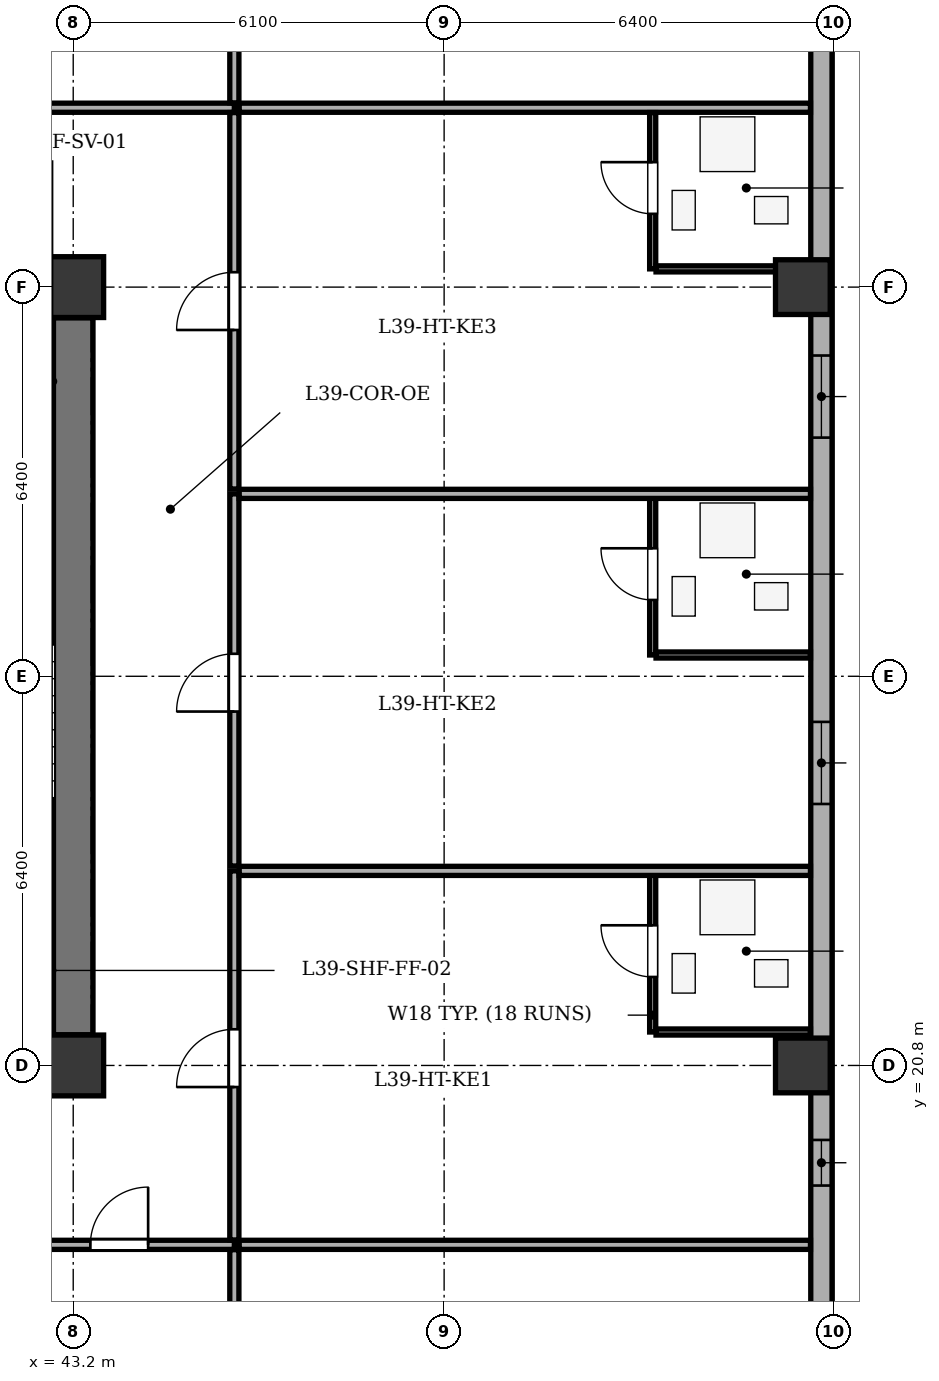
"""IFC4 building model, lengths in metres.
Left out: names, types, materials, properties, quantities, classifications, styles, units other than length and angle.
Written with IfcOpenShell. Run it as: python <this file> out.ifc"""

import sys

from ifc_helpers import new_model, si_unit, direction, frame, frame_2d, origin, origin_2d, place, context, subcontext, project, spatial, rectangle, extrude, element, fill, save


model = new_model("IFC4")
c1 = context("Model", 3, precision=1e-05, world=origin(), true_north=direction((0.0, 1.0)))
c2 = subcontext(c1, "Body", "Model", "MODEL_VIEW")
j1 = project(units=[si_unit("LENGTHUNIT", "METRE"), si_unit("PLANEANGLEUNIT", "RADIAN")], contexts=[c1])
p1 = place(None, origin())
s1 = spatial("IfcSite", under=j1, at=p1, CompositionType="ELEMENT")
p2 = place(p1, origin())
s2 = spatial("IfcBuilding", under=s1, at=p2, CompositionType="ELEMENT")
p3 = place(p2, frame((0.0, 0.0, 155.3)))
s3 = spatial("IfcBuildingStorey", under=s2, at=p3, CompositionType="ELEMENT", Elevation=155.3)
for number, where, z_axis, x_axis in (
    (1, (43.2, 20.8, 0.0), (0.0, 0.0, 1.0), (1.0, 0.0, 0.0)),
    (2, (43.2, 33.6, 0.0), (0.0, 0.0, 1.0), (1.0, 0.0, 0.0)),
):
    element("IfcColumn", number, at=place(p3, frame(where, z_axis=z_axis, x_axis=x_axis)), inside=s3, PredefinedType="COLUMN", context=c2, shape_type="SweptSolid", body=[
        extrude(rectangle(XDim=1.0, YDim=1.0, at=origin_2d()), origin(), (0.0, 0.0, 1.0), 3.5),
    ])
for number, where, z_axis, x_axis in (
    (3, (55.2, 20.8, 0.0), (0.0, 0.0, 1.0), (1.0, 0.0, 0.0)),
    (4, (55.2, 33.6, 0.0), (0.0, 0.0, 1.0), (1.0, 0.0, 0.0)),
):
    element("IfcColumn", number, at=place(p3, frame(where, z_axis=z_axis, x_axis=x_axis)), inside=s3, PredefinedType="COLUMN", context=c2, shape_type="SweptSolid", body=[
        extrude(rectangle(XDim=0.9, YDim=0.9, at=origin_2d()), origin(), (0.0, 0.0, 1.0), 3.5),
    ])
p4 = place(p3, frame((55.505, 41.5, 0.0), z_axis=(0.0, 0.0, 1.0), x_axis=(0.0, -1.0, 0.0)))
e5 = element("IfcWall", 5, at=p4, inside=s3, PredefinedType="STANDARD", context=c2, shape_type="SweptSolid", body=[
    extrude(rectangle(XDim=35.0, YDim=0.35, at=frame_2d((17.5, 0.0))), origin(), (0.0, 0.0, 1.0), 2.785),
])
p5 = place(p4, frame((1.813, 0.0, 0.75)))
e6 = element("IfcOpeningElement", 6, at=p5, cuts=e5, PredefinedType="OPENING", context=c2, shape_type="SweptSolid", body=[
    extrude(rectangle(XDim=1.6, YDim=1.75, at=frame_2d((0.8, 0.875))), frame((0.0, 0.185, 0.0), z_axis=(0.0, -1.0, 0.0), x_axis=(1.0, 0.0, 0.0)), (0.0, 0.0, 1.0), 0.37),
])
p6 = place(p4, frame((9.025, 0.0, 0.75)))
e7 = element("IfcOpeningElement", 7, at=p6, cuts=e5, PredefinedType="OPENING", context=c2, shape_type="SweptSolid", body=[
    extrude(rectangle(XDim=1.35, YDim=1.75, at=frame_2d((0.675, 0.875))), frame((0.0, 0.185, 0.0), z_axis=(0.0, -1.0, 0.0), x_axis=(1.0, 0.0, 0.0)), (0.0, 0.0, 1.0), 0.37),
])
p7 = place(p4, frame((15.05, 0.0, 0.75)))
e8 = element("IfcOpeningElement", 8, at=p7, cuts=e5, PredefinedType="OPENING", context=c2, shape_type="SweptSolid", body=[
    extrude(rectangle(XDim=1.35, YDim=1.75, at=frame_2d((0.675, 0.875))), frame((0.0, 0.185, 0.0), z_axis=(0.0, -1.0, 0.0), x_axis=(1.0, 0.0, 0.0)), (0.0, 0.0, 1.0), 0.37),
])
p8 = place(p4, frame((25.97, 0.0, 0.75)))
e9 = element("IfcOpeningElement", 9, at=p8, cuts=e5, PredefinedType="OPENING", context=c2, shape_type="SweptSolid", body=[
    extrude(rectangle(XDim=1.6, YDim=1.75, at=frame_2d((0.8, 0.875))), frame((0.0, 0.185, 0.0), z_axis=(0.0, -1.0, 0.0), x_axis=(1.0, 0.0, 0.0)), (0.0, 0.0, 1.0), 0.37),
])
p9 = place(p4, frame((30.555, 0.0, 0.75)))
e10 = element("IfcOpeningElement", 10, at=p9, cuts=e5, PredefinedType="OPENING", context=c2, shape_type="SweptSolid", body=[
    extrude(rectangle(XDim=2.1, YDim=1.75, at=frame_2d((1.05, 0.875))), frame((0.0, 0.185, 0.0), z_axis=(0.0, -1.0, 0.0), x_axis=(1.0, 0.0, 0.0)), (0.0, 0.0, 1.0), 0.37),
])
p10 = place(p4, frame((21.925, 0.0, 0.75)))
e11 = element("IfcOpeningElement", 11, at=p10, cuts=e5, PredefinedType="OPENING", context=c2, shape_type="SweptSolid", body=[
    extrude(rectangle(XDim=0.75, YDim=1.45, at=frame_2d((0.375, 0.725))), frame((0.0, 0.185, 0.0), z_axis=(0.0, -1.0, 0.0), x_axis=(1.0, 0.0, 0.0)), (0.0, 0.0, 1.0), 0.37),
])
p11 = place(p3, frame((43.2, 21.305, 0.0), z_axis=(0.0, 0.0, 1.0), x_axis=(0.0, 1.0, 0.0)))
e12 = element("IfcWall", 12, at=p11, inside=s3, PredefinedType="SHEAR", context=c2, shape_type="SweptSolid", body=[
    extrude(rectangle(XDim=11.79, YDim=0.65, at=frame_2d((5.895, 0.0))), origin(), (0.0, 0.0, 1.0), 3.2),
])
for number, where, z_axis, x_axis in (
    (13, (39.69, 23.57, 0.0), (0.0, 0.0, 1.0), (1.0, 0.0, 0.0)),
    (14, (39.69, 30.83, 0.0), (0.0, 0.0, 1.0), (1.0, 0.0, 0.0)),
):
    element("IfcWall", number, at=place(p3, frame(where, z_axis=z_axis, x_axis=x_axis)), inside=s3, PredefinedType="SHEAR", context=c2, shape_type="SweptSolid", body=[
        extrude(rectangle(XDim=3.175, YDim=0.25, at=frame_2d((1.587, 0.0))), origin(), (0.0, 0.0, 1.0), 3.2),
    ])
p12 = place(p3, frame((42.073, 17.85, 0.0), z_axis=(0.0, 0.0, 1.0), x_axis=(1.0, 0.0, 0.0)))
e15 = element("IfcWall", 15, at=p12, inside=s3, PredefinedType="PARTITIONING", context=c2, shape_type="SweptSolid", body=[
    extrude(rectangle(XDim=3.777, YDim=0.15, at=frame_2d((1.889, 0.0))), origin(), (0.0, 0.0, 1.0), 3.2),
])
p13 = place(p12, frame((1.409, 0.0, 0.0)))
e16 = element("IfcOpeningElement", 16, at=p13, cuts=e15, PredefinedType="OPENING", context=c2, shape_type="SweptSolid", body=[
    extrude(rectangle(XDim=0.95, YDim=2.1, at=frame_2d((0.475, 1.05))), frame((0.0, 0.085, 0.0), z_axis=(0.0, -1.0, 0.0), x_axis=(1.0, 0.0, 0.0)), (0.0, 0.0, 1.0), 0.17),
])
p14 = place(p3, frame((45.85, 1.875, 0.0), z_axis=(0.0, 0.0, 1.0), x_axis=(0.0, 1.0, 0.0)))
e17 = element("IfcWall", 17, at=p14, inside=s3, PredefinedType="PARTITIONING", context=c2, shape_type="SweptSolid", body=[
    extrude(rectangle(XDim=15.895, YDim=0.15, at=frame_2d((7.948, 0.0))), origin(), (0.0, 0.0, 1.0), 3.2),
])
p15 = place(p3, frame((32.664, 36.55, 0.0), z_axis=(0.0, 0.0, 1.0), x_axis=(1.0, 0.0, 0.0)))
e18 = element("IfcWall", 18, at=p15, inside=s3, PredefinedType="PARTITIONING", context=c2, shape_type="SweptSolid", body=[
    extrude(rectangle(XDim=13.186, YDim=0.15, at=frame_2d((6.593, 0.0))), origin(), (0.0, 0.0, 1.0), 3.2),
])
p16 = place(p15, frame((6.033, 0.0, 0.0)))
e19 = element("IfcOpeningElement", 19, at=p16, cuts=e18, PredefinedType="OPENING", context=c2, shape_type="SweptSolid", body=[
    extrude(rectangle(XDim=1.0, YDim=2.1, at=frame_2d((0.5, 1.05))), frame((0.0, 0.085, 0.0), z_axis=(0.0, -1.0, 0.0), x_axis=(1.0, 0.0, 0.0)), (0.0, 0.0, 1.0), 0.17),
])
p17 = place(p3, frame((45.85, 36.63, 0.0), z_axis=(0.0, 0.0, 1.0), x_axis=(0.0, 1.0, 0.0)))
e20 = element("IfcWall", 20, at=p17, inside=s3, PredefinedType="PARTITIONING", context=c2, shape_type="SweptSolid", body=[
    extrude(rectangle(XDim=9.495, YDim=0.15, at=frame_2d((4.748, 0.0))), origin(), (0.0, 0.0, 1.0), 3.2),
])
for number, where, z_axis, x_axis in (
    (21, (45.93, 17.85, 0.0), (0.0, 0.0, 1.0), (1.0, 0.0, 0.0)),
    (22, (45.93, 36.55, 0.0), (0.0, 0.0, 1.0), (1.0, 0.0, 0.0)),
):
    element("IfcWall", number, at=place(p3, frame(where, z_axis=z_axis, x_axis=x_axis)), inside=s3, PredefinedType="PARTITIONING", context=c2, shape_type="SweptSolid", body=[
        extrude(rectangle(XDim=9.395, YDim=0.15, at=frame_2d((4.698, 0.0))), origin(), (0.0, 0.0, 1.0), 3.2),
    ])
p18 = place(p3, frame((45.85, 17.93, 0.0), z_axis=(0.0, 0.0, 1.0), x_axis=(0.0, 1.0, 0.0)))
e23 = element("IfcWall", 23, at=p18, inside=s3, PredefinedType="PARTITIONING", context=c2, shape_type="SweptSolid", body=[
    extrude(rectangle(XDim=6.07, YDim=0.15, at=frame_2d((3.035, 0.0))), origin(), (0.0, 0.0, 1.0), 3.2),
])
p19 = place(p18, frame((2.515, 0.0, 0.0)))
e24 = element("IfcOpeningElement", 24, at=p19, cuts=e23, PredefinedType="OPENING", context=c2, shape_type="SweptSolid", body=[
    extrude(rectangle(XDim=0.95, YDim=2.1, at=frame_2d((0.475, 1.05))), frame((0.0, 0.085, 0.0), z_axis=(0.0, -1.0, 0.0), x_axis=(1.0, 0.0, 0.0)), (0.0, 0.0, 1.0), 0.17),
])
p20 = place(p3, frame((52.73, 21.35, 0.0), z_axis=(0.0, 0.0, 1.0), x_axis=(0.0, 1.0, 0.0)))
e25 = element("IfcWall", 25, at=p20, inside=s3, PredefinedType="PARTITIONING", context=c2, shape_type="SweptSolid", body=[
    extrude(rectangle(XDim=2.65, YDim=0.1, at=frame_2d((1.325, 0.0))), origin(), (0.0, 0.0, 1.0), 3.2),
])
p21 = place(p20, frame((0.905, 0.0, 0.0)))
e26 = element("IfcOpeningElement", 26, at=p21, cuts=e25, PredefinedType="OPENING", context=c2, shape_type="SweptSolid", body=[
    extrude(rectangle(XDim=0.85, YDim=2.05, at=frame_2d((0.425, 1.025))), frame((0.0, 0.06, 0.0), z_axis=(0.0, -1.0, 0.0), x_axis=(1.0, 0.0, 0.0)), (0.0, 0.0, 1.0), 0.12),
])
p22 = place(p3, frame((52.785, 21.35, 0.0), z_axis=(0.0, 0.0, 1.0), x_axis=(1.0, 0.0, 0.0)))
e27 = element("IfcWall", 27, at=p22, inside=s3, PredefinedType="PARTITIONING", context=c2, shape_type="SweptSolid", body=[
    extrude(rectangle(XDim=2.54, YDim=0.1, at=frame_2d((1.27, 0.0))), origin(), (0.0, 0.0, 1.0), 3.2),
])
p23 = place(p3, frame((45.93, 24.0, 0.0), z_axis=(0.0, 0.0, 1.0), x_axis=(1.0, 0.0, 0.0)))
e28 = element("IfcWall", 28, at=p23, inside=s3, PredefinedType="PARTITIONING", context=c2, shape_type="SweptSolid", body=[
    extrude(rectangle(XDim=9.395, YDim=0.15, at=frame_2d((4.698, 0.0))), origin(), (0.0, 0.0, 1.0), 3.2),
])
p24 = place(p3, frame((45.85, 24.08, 0.0), z_axis=(0.0, 0.0, 1.0), x_axis=(0.0, 1.0, 0.0)))
e29 = element("IfcWall", 29, at=p24, inside=s3, PredefinedType="PARTITIONING", context=c2, shape_type="SweptSolid", body=[
    extrude(rectangle(XDim=6.12, YDim=0.15, at=frame_2d((3.06, 0.0))), origin(), (0.0, 0.0, 1.0), 3.2),
])
p25 = place(p24, frame((2.54, 0.0, 0.0)))
e30 = element("IfcOpeningElement", 30, at=p25, cuts=e29, PredefinedType="OPENING", context=c2, shape_type="SweptSolid", body=[
    extrude(rectangle(XDim=0.95, YDim=2.1, at=frame_2d((0.475, 1.05))), frame((0.0, 0.085, 0.0), z_axis=(0.0, -1.0, 0.0), x_axis=(1.0, 0.0, 0.0)), (0.0, 0.0, 1.0), 0.17),
])
p26 = place(p3, frame((52.73, 27.55, 0.0), z_axis=(0.0, 0.0, 1.0), x_axis=(0.0, 1.0, 0.0)))
e31 = element("IfcWall", 31, at=p26, inside=s3, PredefinedType="PARTITIONING", context=c2, shape_type="SweptSolid", body=[
    extrude(rectangle(XDim=2.65, YDim=0.1, at=frame_2d((1.325, 0.0))), origin(), (0.0, 0.0, 1.0), 3.2),
])
p27 = place(p26, frame((0.905, 0.0, 0.0)))
e32 = element("IfcOpeningElement", 32, at=p27, cuts=e31, PredefinedType="OPENING", context=c2, shape_type="SweptSolid", body=[
    extrude(rectangle(XDim=0.85, YDim=2.05, at=frame_2d((0.425, 1.025))), frame((0.0, 0.06, 0.0), z_axis=(0.0, -1.0, 0.0), x_axis=(1.0, 0.0, 0.0)), (0.0, 0.0, 1.0), 0.12),
])
p28 = place(p3, frame((52.785, 27.55, 0.0), z_axis=(0.0, 0.0, 1.0), x_axis=(1.0, 0.0, 0.0)))
e33 = element("IfcWall", 33, at=p28, inside=s3, PredefinedType="PARTITIONING", context=c2, shape_type="SweptSolid", body=[
    extrude(rectangle(XDim=2.54, YDim=0.1, at=frame_2d((1.27, 0.0))), origin(), (0.0, 0.0, 1.0), 3.2),
])
p29 = place(p3, frame((45.93, 30.2, 0.0), z_axis=(0.0, 0.0, 1.0), x_axis=(1.0, 0.0, 0.0)))
e34 = element("IfcWall", 34, at=p29, inside=s3, PredefinedType="PARTITIONING", context=c2, shape_type="SweptSolid", body=[
    extrude(rectangle(XDim=9.395, YDim=0.15, at=frame_2d((4.698, 0.0))), origin(), (0.0, 0.0, 1.0), 3.2),
])
p30 = place(p3, frame((45.85, 30.28, 0.0), z_axis=(0.0, 0.0, 1.0), x_axis=(0.0, 1.0, 0.0)))
e35 = element("IfcWall", 35, at=p30, inside=s3, PredefinedType="PARTITIONING", context=c2, shape_type="SweptSolid", body=[
    extrude(rectangle(XDim=6.19, YDim=0.15, at=frame_2d((3.095, 0.0))), origin(), (0.0, 0.0, 1.0), 3.2),
])
p31 = place(p30, frame((2.615, 0.0, 0.0)))
e36 = element("IfcOpeningElement", 36, at=p31, cuts=e35, PredefinedType="OPENING", context=c2, shape_type="SweptSolid", body=[
    extrude(rectangle(XDim=0.95, YDim=2.1, at=frame_2d((0.475, 1.05))), frame((0.0, 0.085, 0.0), z_axis=(0.0, -1.0, 0.0), x_axis=(1.0, 0.0, 0.0)), (0.0, 0.0, 1.0), 0.17),
])
p32 = place(p3, frame((52.73, 33.9, 0.0), z_axis=(0.0, 0.0, 1.0), x_axis=(0.0, 1.0, 0.0)))
e37 = element("IfcWall", 37, at=p32, inside=s3, PredefinedType="PARTITIONING", context=c2, shape_type="SweptSolid", body=[
    extrude(rectangle(XDim=2.57, YDim=0.1, at=frame_2d((1.285, 0.0))), origin(), (0.0, 0.0, 1.0), 3.2),
])
p33 = place(p32, frame((0.905, 0.0, 0.0)))
e38 = element("IfcOpeningElement", 38, at=p33, cuts=e37, PredefinedType="OPENING", context=c2, shape_type="SweptSolid", body=[
    extrude(rectangle(XDim=0.85, YDim=2.05, at=frame_2d((0.425, 1.025))), frame((0.0, 0.06, 0.0), z_axis=(0.0, -1.0, 0.0), x_axis=(1.0, 0.0, 0.0)), (0.0, 0.0, 1.0), 0.12),
])
p34 = place(p3, frame((52.785, 33.9, 0.0), z_axis=(0.0, 0.0, 1.0), x_axis=(1.0, 0.0, 0.0)))
e39 = element("IfcWall", 39, at=p34, inside=s3, PredefinedType="PARTITIONING", context=c2, shape_type="SweptSolid", body=[
    extrude(rectangle(XDim=2.54, YDim=0.1, at=frame_2d((1.27, 0.0))), origin(), (0.0, 0.0, 1.0), 2.535),
])
p35 = place(p6, origin())
e40 = element("IfcWindow", 40, at=p35, inside=s3, PartitioningType="SINGLE_PANEL", PredefinedType="WINDOW", context=c2, shape_type="SweptSolid", body=[
    extrude(rectangle(XDim=1.35, YDim=1.75, at=frame_2d((0.675, 0.875))), frame((0.0, -0.01, 0.0), z_axis=(0.0, -1.0, 0.0), x_axis=(1.0, 0.0, 0.0)), (0.0, 0.0, 1.0), 0.06),
])
fill(e7, e40)
p36 = place(p7, origin())
e41 = element("IfcWindow", 41, at=p36, inside=s3, PartitioningType="SINGLE_PANEL", PredefinedType="WINDOW", context=c2, shape_type="SweptSolid", body=[
    extrude(rectangle(XDim=1.35, YDim=1.75, at=frame_2d((0.675, 0.875))), frame((0.0, -0.01, 0.0), z_axis=(0.0, -1.0, 0.0), x_axis=(1.0, 0.0, 0.0)), (0.0, 0.0, 1.0), 0.06),
])
fill(e8, e41)
p37 = place(p10, origin())
e42 = element("IfcWindow", 42, at=p37, inside=s3, PartitioningType="SINGLE_PANEL", PredefinedType="WINDOW", context=c2, shape_type="SweptSolid", body=[
    extrude(rectangle(XDim=0.75, YDim=1.45, at=frame_2d((0.375, 0.725))), frame((0.0, -0.01, 0.0), z_axis=(0.0, -1.0, 0.0), x_axis=(1.0, 0.0, 0.0)), (0.0, 0.0, 1.0), 0.06),
])
fill(e11, e42)
p38 = place(p13, origin())
e43 = element("IfcDoor", 43, at=p38, inside=s3, OperationType="SINGLE_SWING_RIGHT", PredefinedType="DOOR", context=c2, shape_type="SweptSolid", body=[
    extrude(rectangle(XDim=0.95, YDim=2.1, at=frame_2d((0.475, 1.05))), frame((0.0, 0.025, 0.0), z_axis=(0.0, -1.0, 0.0), x_axis=(1.0, 0.0, 0.0)), (0.0, 0.0, 1.0), 0.05),
])
fill(e16, e43)
p39 = place(p21, origin())
e44 = element("IfcDoor", 44, at=p39, inside=s3, OperationType="SINGLE_SWING_RIGHT", PredefinedType="DOOR", context=c2, shape_type="SweptSolid", body=[
    extrude(rectangle(XDim=0.85, YDim=2.05, at=frame_2d((0.425, 1.025))), frame((0.0, 0.025, 0.0), z_axis=(0.0, -1.0, 0.0), x_axis=(1.0, 0.0, 0.0)), (0.0, 0.0, 1.0), 0.05),
])
fill(e26, e44)
p40 = place(p19, origin())
e45 = element("IfcDoor", 45, at=p40, inside=s3, OperationType="SINGLE_SWING_LEFT", PredefinedType="DOOR", context=c2, shape_type="SweptSolid", body=[
    extrude(rectangle(XDim=0.95, YDim=2.1, at=frame_2d((0.475, 1.05))), frame((0.0, 0.025, 0.0), z_axis=(0.0, -1.0, 0.0), x_axis=(1.0, 0.0, 0.0)), (0.0, 0.0, 1.0), 0.05),
])
fill(e24, e45)
p41 = place(p27, origin())
e46 = element("IfcDoor", 46, at=p41, inside=s3, OperationType="SINGLE_SWING_RIGHT", PredefinedType="DOOR", context=c2, shape_type="SweptSolid", body=[
    extrude(rectangle(XDim=0.85, YDim=2.05, at=frame_2d((0.425, 1.025))), frame((0.0, 0.025, 0.0), z_axis=(0.0, -1.0, 0.0), x_axis=(1.0, 0.0, 0.0)), (0.0, 0.0, 1.0), 0.05),
])
fill(e32, e46)
p42 = place(p25, origin())
e47 = element("IfcDoor", 47, at=p42, inside=s3, OperationType="SINGLE_SWING_LEFT", PredefinedType="DOOR", context=c2, shape_type="SweptSolid", body=[
    extrude(rectangle(XDim=0.95, YDim=2.1, at=frame_2d((0.475, 1.05))), frame((0.0, 0.025, 0.0), z_axis=(0.0, -1.0, 0.0), x_axis=(1.0, 0.0, 0.0)), (0.0, 0.0, 1.0), 0.05),
])
fill(e30, e47)
p43 = place(p33, origin())
e48 = element("IfcDoor", 48, at=p43, inside=s3, OperationType="SINGLE_SWING_RIGHT", PredefinedType="DOOR", context=c2, shape_type="SweptSolid", body=[
    extrude(rectangle(XDim=0.85, YDim=2.05, at=frame_2d((0.425, 1.025))), frame((0.0, 0.025, 0.0), z_axis=(0.0, -1.0, 0.0), x_axis=(1.0, 0.0, 0.0)), (0.0, 0.0, 1.0), 0.05),
])
fill(e38, e48)
p44 = place(p31, origin())
e49 = element("IfcDoor", 49, at=p44, inside=s3, OperationType="SINGLE_SWING_LEFT", PredefinedType="DOOR", context=c2, shape_type="SweptSolid", body=[
    extrude(rectangle(XDim=0.95, YDim=2.1, at=frame_2d((0.475, 1.05))), frame((0.0, 0.025, 0.0), z_axis=(0.0, -1.0, 0.0), x_axis=(1.0, 0.0, 0.0)), (0.0, 0.0, 1.0), 0.05),
])
fill(e36, e49)
save(model, sys.argv[1])
